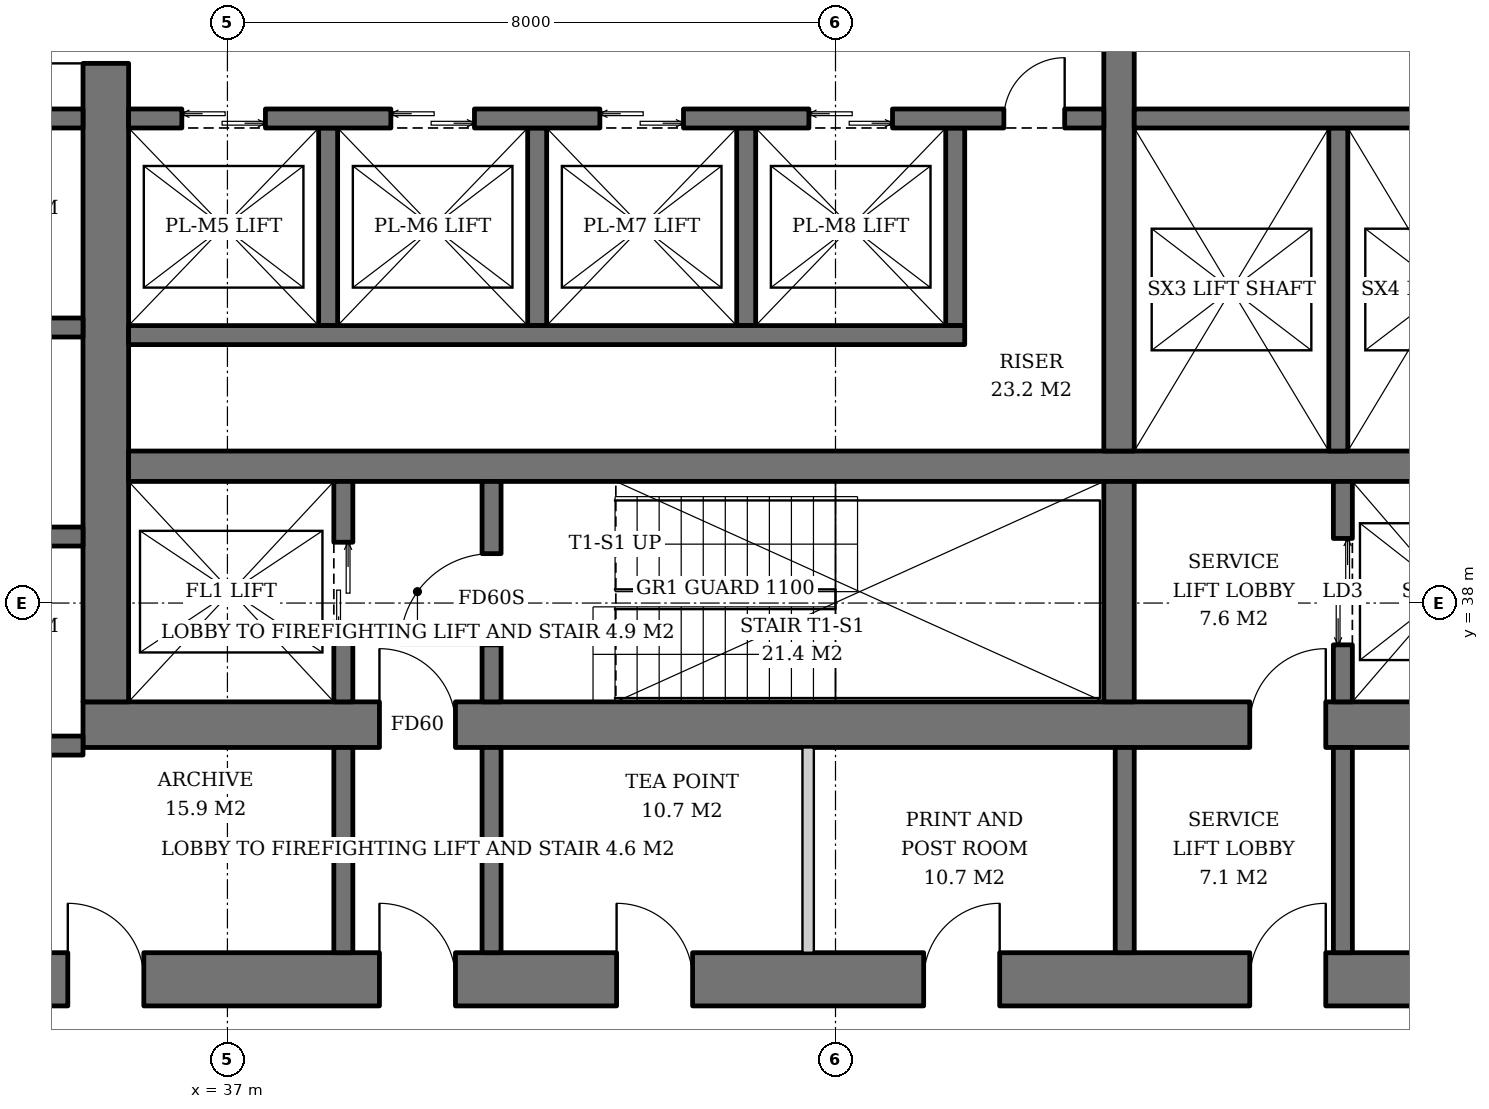
"""IFC4 building model, lengths in metres.
Left out: names, types, materials, properties, quantities, classifications, styles, units other than length and angle.
Written with IfcOpenShell. Run it as: python <this file> out.ifc"""

import sys

from ifc_helpers import new_model, si_unit, direction, frame, frame_2d, origin, place, context, subcontext, project, spatial, rectangle, extrude, element, fill, save


model = new_model("IFC4")
c1 = context("Model", 3, precision=1e-05, world=origin(), true_north=direction((0.0, 1.0)))
c2 = subcontext(c1, "Body", "Model", "MODEL_VIEW")
j1 = project(units=[si_unit("LENGTHUNIT", "METRE"), si_unit("PLANEANGLEUNIT", "RADIAN")], contexts=[c1])
p1 = place(None, origin())
s1 = spatial("IfcSite", under=j1, at=p1, CompositionType="ELEMENT")
p2 = place(p1, origin())
s2 = spatial("IfcBuilding", under=s1, at=p2, CompositionType="ELEMENT")
p3 = place(p2, frame((0.0, 0.0, 116.0)))
s3 = spatial("IfcBuildingStorey", under=s2, at=p3, CompositionType="ELEMENT", Elevation=116.0)
p4 = place(p3, frame((35.1, 36.4, 0.0), z_axis=(0.0, 0.0, 1.0), x_axis=(1.0, 0.0, 0.0)))
e1 = element("IfcWall", 1, at=p4, inside=s3, PredefinedType="SHEAR", context=c2, shape_type="SweptSolid", body=[
    extrude(rectangle(XDim=19.8, YDim=0.6, at=frame_2d((9.9, 0.0))), origin(), (0.0, 0.0, 1.0), 3.8),
])
p5 = place(p4, frame((3.9, 0.0, 0.0)))
e2 = element("IfcOpeningElement", 2, at=p5, cuts=e1, PredefinedType="OPENING", context=c2, shape_type="SweptSolid", body=[
    extrude(rectangle(XDim=1.0, YDim=2.1, at=frame_2d((0.5, 1.05))), frame((0.0, 0.31, 0.0), z_axis=(0.0, -1.0, 0.0), x_axis=(1.0, 0.0, 0.0)), (0.0, 0.0, 1.0), 0.62),
])
p6 = place(p4, frame((15.35, 0.0, 0.0)))
e3 = element("IfcOpeningElement", 3, at=p6, cuts=e1, PredefinedType="OPENING", context=c2, shape_type="SweptSolid", body=[
    extrude(rectangle(XDim=1.0, YDim=2.1, at=frame_2d((0.5, 1.05))), frame((0.0, 0.31, 0.0), z_axis=(0.0, -1.0, 0.0), x_axis=(1.0, 0.0, 0.0)), (0.0, 0.0, 1.0), 0.62),
])
p7 = place(p3, frame((35.4, 36.7, 0.0), z_axis=(0.0, 0.0, 1.0), x_axis=(0.0, 1.0, 0.0)))
e4 = element("IfcWall", 4, at=p7, inside=s3, PredefinedType="SHEAR", context=c2, shape_type="SweptSolid", body=[
    extrude(rectangle(XDim=18.6, YDim=0.6, at=frame_2d((9.3, 0.0))), origin(), (0.0, 0.0, 1.0), 3.8),
])
p8 = place(p7, frame((8.4, 0.0, 0.0)))
e5 = element("IfcOpeningElement", 5, at=p8, cuts=e4, PredefinedType="OPENING", context=c2, shape_type="SweptSolid", body=[
    extrude(rectangle(XDim=1.8, YDim=2.4, at=frame_2d((0.9, 1.2))), frame((0.0, 0.31, 0.0), z_axis=(0.0, -1.0, 0.0), x_axis=(1.0, 0.0, 0.0)), (0.0, 0.0, 1.0), 0.62),
])
p9 = place(p3, frame((31.7, 33.05, 0.0), z_axis=(0.0, 0.0, 1.0), x_axis=(1.0, 0.0, 0.0)))
e6 = element("IfcWall", 6, at=p9, inside=s3, PredefinedType="SHEAR", context=c2, shape_type="SweptSolid", body=[
    extrude(rectangle(XDim=26.6, YDim=0.7, at=frame_2d((13.3, 0.0))), origin(), (0.0, 0.0, 1.0), 3.8),
])
p10 = place(p9, frame((7.3, 0.0, 0.0)))
e7 = element("IfcOpeningElement", 7, at=p10, cuts=e6, PredefinedType="OPENING", context=c2, shape_type="SweptSolid", body=[
    extrude(rectangle(XDim=1.0, YDim=2.1, at=frame_2d((0.5, 1.05))), frame((0.0, 0.36, 0.0), z_axis=(0.0, -1.0, 0.0), x_axis=(1.0, 0.0, 0.0)), (0.0, 0.0, 1.0), 0.72),
])
p11 = place(p9, frame((18.75, 0.0, 0.0)))
e8 = element("IfcOpeningElement", 8, at=p11, cuts=e6, PredefinedType="OPENING", context=c2, shape_type="SweptSolid", body=[
    extrude(rectangle(XDim=1.0, YDim=2.1, at=frame_2d((0.5, 1.05))), frame((0.0, 0.36, 0.0), z_axis=(0.0, -1.0, 0.0), x_axis=(1.0, 0.0, 0.0)), (0.0, 0.0, 1.0), 0.72),
])
p12 = place(p9, frame((3.2, 0.0, 0.0)))
e9 = element("IfcOpeningElement", 9, at=p12, cuts=e6, PredefinedType="OPENING", context=c2, shape_type="SweptSolid", body=[
    extrude(rectangle(XDim=1.0, YDim=2.1, at=frame_2d((0.5, 1.05))), frame((0.0, 0.36, 0.0), z_axis=(0.0, -1.0, 0.0), x_axis=(1.0, 0.0, 0.0)), (0.0, 0.0, 1.0), 0.72),
])
p13 = place(p9, frame((10.42, 0.0, 0.0)))
e10 = element("IfcOpeningElement", 10, at=p13, cuts=e6, PredefinedType="OPENING", context=c2, shape_type="SweptSolid", body=[
    extrude(rectangle(XDim=1.0, YDim=2.1, at=frame_2d((0.5, 1.05))), frame((0.0, 0.36, 0.0), z_axis=(0.0, -1.0, 0.0), x_axis=(1.0, 0.0, 0.0)), (0.0, 0.0, 1.0), 0.72),
])
p14 = place(p9, frame((14.46, 0.0, 0.0)))
e11 = element("IfcOpeningElement", 11, at=p14, cuts=e6, PredefinedType="OPENING", context=c2, shape_type="SweptSolid", body=[
    extrude(rectangle(XDim=1.0, YDim=2.1, at=frame_2d((0.5, 1.05))), frame((0.0, 0.36, 0.0), z_axis=(0.0, -1.0, 0.0), x_axis=(1.0, 0.0, 0.0)), (0.0, 0.0, 1.0), 0.72),
])
p15 = place(p9, frame((22.5, 0.0, 0.0)))
e12 = element("IfcOpeningElement", 12, at=p15, cuts=e6, PredefinedType="OPENING", context=c2, shape_type="SweptSolid", body=[
    extrude(rectangle(XDim=1.0, YDim=2.1, at=frame_2d((0.5, 1.05))), frame((0.0, 0.36, 0.0), z_axis=(0.0, -1.0, 0.0), x_axis=(1.0, 0.0, 0.0)), (0.0, 0.0, 1.0), 0.72),
])
p16 = place(p3, frame((35.7, 39.8, 0.0), z_axis=(0.0, 0.0, 1.0), x_axis=(1.0, 0.0, 0.0)))
e13 = element("IfcWall", 13, at=p16, inside=s3, PredefinedType="SHEAR", context=c2, shape_type="SweptSolid", body=[
    extrude(rectangle(XDim=18.6, YDim=0.4, at=frame_2d((9.3, 0.0))), origin(), (0.0, 0.0, 1.0), 3.8),
])
p17 = place(p3, frame((48.73, 36.7, 0.0), z_axis=(0.0, 0.0, 1.0), x_axis=(0.0, 1.0, 0.0)))
e14 = element("IfcWall", 14, at=p17, inside=s3, PredefinedType="SHEAR", context=c2, shape_type="SweptSolid", body=[
    extrude(rectangle(XDim=2.9, YDim=0.4, at=frame_2d((1.45, 0.0))), origin(), (0.0, 0.0, 1.0), 3.8),
])
p18 = place(p3, frame((48.73, 40.0, 0.0), z_axis=(0.0, 0.0, 1.0), x_axis=(0.0, 1.0, 0.0)))
e15 = element("IfcWall", 15, at=p18, inside=s3, PredefinedType="SHEAR", context=c2, shape_type="SweptSolid", body=[
    extrude(rectangle(XDim=12.0, YDim=0.4, at=frame_2d((6.0, 0.0))), origin(), (0.0, 0.0, 1.0), 3.8),
])
p19 = place(p3, frame((38.525, 36.7, 0.0), z_axis=(0.0, 0.0, 1.0), x_axis=(0.0, 1.0, 0.0)))
e16 = element("IfcWall", 16, at=p19, inside=s3, PredefinedType="SHEAR", context=c2, shape_type="SweptSolid", body=[
    extrude(rectangle(XDim=2.9, YDim=0.25, at=frame_2d((1.45, 0.0))), origin(), (0.0, 0.0, 1.0), 3.8),
])
p20 = place(p19, frame((0.8, 0.0, 0.0)))
e17 = element("IfcOpeningElement", 17, at=p20, cuts=e16, PredefinedType="OPENING", context=c2, shape_type="SweptSolid", body=[
    extrude(rectangle(XDim=1.3, YDim=2.2, at=frame_2d((0.65, 1.1))), frame((0.0, 0.135, 0.0), z_axis=(0.0, -1.0, 0.0), x_axis=(1.0, 0.0, 0.0)), (0.0, 0.0, 1.0), 0.27),
])
p21 = place(p3, frame((40.475, 36.7, 0.0), z_axis=(0.0, 0.0, 1.0), x_axis=(0.0, 1.0, 0.0)))
e18 = element("IfcWall", 18, at=p21, inside=s3, PredefinedType="SHEAR", context=c2, shape_type="SweptSolid", body=[
    extrude(rectangle(XDim=2.9, YDim=0.25, at=frame_2d((1.45, 0.0))), origin(), (0.0, 0.0, 1.0), 3.8),
])
p22 = place(p21, frame((0.75, 0.0, 0.0)))
e19 = element("IfcOpeningElement", 19, at=p22, cuts=e18, PredefinedType="OPENING", context=c2, shape_type="SweptSolid", body=[
    extrude(rectangle(XDim=1.2, YDim=2.1, at=frame_2d((0.6, 1.05))), frame((0.0, 0.135, 0.0), z_axis=(0.0, -1.0, 0.0), x_axis=(1.0, 0.0, 0.0)), (0.0, 0.0, 1.0), 0.27),
])
p23 = place(p3, frame((51.675, 36.7, 0.0), z_axis=(0.0, 0.0, 1.0), x_axis=(0.0, 1.0, 0.0)))
e20 = element("IfcWall", 20, at=p23, inside=s3, PredefinedType="SHEAR", context=c2, shape_type="SweptSolid", body=[
    extrude(rectangle(XDim=2.9, YDim=0.25, at=frame_2d((1.45, 0.0))), origin(), (0.0, 0.0, 1.0), 3.8),
])
p24 = place(p23, frame((0.75, 0.0, 0.0)))
e21 = element("IfcOpeningElement", 21, at=p24, cuts=e20, PredefinedType="OPENING", context=c2, shape_type="SweptSolid", body=[
    extrude(rectangle(XDim=1.4, YDim=2.4, at=frame_2d((0.7, 1.2))), frame((0.0, 0.135, 0.0), z_axis=(0.0, -1.0, 0.0), x_axis=(1.0, 0.0, 0.0)), (0.0, 0.0, 1.0), 0.27),
])
for number, where, z_axis, x_axis in (
    (22, (38.325, 44.25, 0.0), (0.0, 0.0, 1.0), (0.0, -1.0, 0.0)),
    (23, (41.075, 44.25, 0.0), (0.0, 0.0, 1.0), (0.0, -1.0, 0.0)),
    (24, (43.825, 44.25, 0.0), (0.0, 0.0, 1.0), (0.0, -1.0, 0.0)),
    (25, (46.575, 44.25, 0.0), (0.0, 0.0, 1.0), (0.0, -1.0, 0.0)),
):
    element("IfcWall", number, at=place(p3, frame(where, z_axis=z_axis, x_axis=x_axis)), inside=s3, PredefinedType="SHEAR", context=c2, shape_type="SweptSolid", body=[
        extrude(rectangle(XDim=2.6, YDim=0.25, at=frame_2d((1.3, 0.0))), origin(), (0.0, 0.0, 1.0), 3.8),
    ])
p25 = place(p3, frame((35.7, 41.525, 0.0), z_axis=(0.0, 0.0, 1.0), x_axis=(1.0, 0.0, 0.0)))
e26 = element("IfcWall", 26, at=p25, inside=s3, PredefinedType="SHEAR", context=c2, shape_type="SweptSolid", body=[
    extrude(rectangle(XDim=11.0, YDim=0.25, at=frame_2d((5.5, 0.0))), origin(), (0.0, 0.0, 1.0), 3.8),
])
p26 = place(p3, frame((35.7, 44.375, 0.0), z_axis=(0.0, 0.0, 1.0), x_axis=(1.0, 0.0, 0.0)))
e27 = element("IfcWall", 27, at=p26, inside=s3, PredefinedType="SHEAR", context=c2, shape_type="SweptSolid", body=[
    extrude(rectangle(XDim=12.83, YDim=0.25, at=frame_2d((6.415, 0.0))), origin(), (0.0, 0.0, 1.0), 3.8),
])
p27 = place(p26, frame((0.7, 0.0, 0.0)))
e28 = element("IfcOpeningElement", 28, at=p27, cuts=e27, PredefinedType="OPENING", context=c2, shape_type="SweptSolid", body=[
    extrude(rectangle(XDim=1.1, YDim=2.2, at=frame_2d((0.55, 1.1))), frame((0.0, 0.135, 0.0), z_axis=(0.0, -1.0, 0.0), x_axis=(1.0, 0.0, 0.0)), (0.0, 0.0, 1.0), 0.27),
])
p28 = place(p26, frame((3.45, 0.0, 0.0)))
e29 = element("IfcOpeningElement", 29, at=p28, cuts=e27, PredefinedType="OPENING", context=c2, shape_type="SweptSolid", body=[
    extrude(rectangle(XDim=1.1, YDim=2.2, at=frame_2d((0.55, 1.1))), frame((0.0, 0.135, 0.0), z_axis=(0.0, -1.0, 0.0), x_axis=(1.0, 0.0, 0.0)), (0.0, 0.0, 1.0), 0.27),
])
p29 = place(p26, frame((6.2, 0.0, 0.0)))
e30 = element("IfcOpeningElement", 30, at=p29, cuts=e27, PredefinedType="OPENING", context=c2, shape_type="SweptSolid", body=[
    extrude(rectangle(XDim=1.1, YDim=2.2, at=frame_2d((0.55, 1.1))), frame((0.0, 0.135, 0.0), z_axis=(0.0, -1.0, 0.0), x_axis=(1.0, 0.0, 0.0)), (0.0, 0.0, 1.0), 0.27),
])
p30 = place(p26, frame((8.95, 0.0, 0.0)))
e31 = element("IfcOpeningElement", 31, at=p30, cuts=e27, PredefinedType="OPENING", context=c2, shape_type="SweptSolid", body=[
    extrude(rectangle(XDim=1.1, YDim=2.2, at=frame_2d((0.55, 1.1))), frame((0.0, 0.135, 0.0), z_axis=(0.0, -1.0, 0.0), x_axis=(1.0, 0.0, 0.0)), (0.0, 0.0, 1.0), 0.27),
])
p31 = place(p26, frame((11.515, 0.0, 0.0)))
e32 = element("IfcOpeningElement", 32, at=p31, cuts=e27, PredefinedType="OPENING", context=c2, shape_type="SweptSolid", body=[
    extrude(rectangle(XDim=0.8, YDim=2.0, at=frame_2d((0.4, 1.0))), frame((0.0, 0.135, 0.0), z_axis=(0.0, -1.0, 0.0), x_axis=(1.0, 0.0, 0.0)), (0.0, 0.0, 1.0), 0.27),
])
p32 = place(p3, frame((51.615, 44.25, 0.0), z_axis=(0.0, 0.0, 1.0), x_axis=(0.0, -1.0, 0.0)))
e33 = element("IfcWall", 33, at=p32, inside=s3, PredefinedType="SHEAR", context=c2, shape_type="SweptSolid", body=[
    extrude(rectangle(XDim=4.25, YDim=0.25, at=frame_2d((2.125, 0.0))), origin(), (0.0, 0.0, 1.0), 3.8),
])
p33 = place(p3, frame((48.93, 44.375, 0.0), z_axis=(0.0, 0.0, 1.0), x_axis=(1.0, 0.0, 0.0)))
e34 = element("IfcWall", 34, at=p33, inside=s3, PredefinedType="SHEAR", context=c2, shape_type="SweptSolid", body=[
    extrude(rectangle(XDim=5.37, YDim=0.25, at=frame_2d((2.685, 0.0))), origin(), (0.0, 0.0, 1.0), 3.8),
])
for number, where, z_axis, x_axis in (
    (35, (32.4, 36.125, 0.0), (0.0, 0.0, 1.0), (1.0, 0.0, 0.0)),
    (36, (32.4, 38.875, 0.0), (0.0, 0.0, 1.0), (1.0, 0.0, 0.0)),
    (37, (32.4, 41.625, 0.0), (0.0, 0.0, 1.0), (1.0, 0.0, 0.0)),
    (38, (32.4, 44.375, 0.0), (0.0, 0.0, 1.0), (1.0, 0.0, 0.0)),
):
    element("IfcWall", number, at=place(p3, frame(where, z_axis=z_axis, x_axis=x_axis)), inside=s3, PredefinedType="SHEAR", context=c2, shape_type="SweptSolid", body=[
        extrude(rectangle(XDim=2.7, YDim=0.25, at=frame_2d((1.35, 0.0))), origin(), (0.0, 0.0, 1.0), 3.8),
    ])
for number, where, z_axis, x_axis in (
    (39, (38.525, 33.4, 0.0), (0.0, 0.0, 1.0), (0.0, 1.0, 0.0)),
    (40, (40.475, 33.4, 0.0), (0.0, 0.0, 1.0), (0.0, 1.0, 0.0)),
    (41, (48.805, 33.4, 0.0), (0.0, 0.0, 1.0), (0.0, 1.0, 0.0)),
    (42, (51.675, 33.4, 0.0), (0.0, 0.0, 1.0), (0.0, 1.0, 0.0)),
):
    element("IfcWall", number, at=place(p3, frame(where, z_axis=z_axis, x_axis=x_axis)), inside=s3, PredefinedType="SOLIDWALL", context=c2, shape_type="SweptSolid", body=[
        extrude(rectangle(XDim=2.7, YDim=0.25, at=frame_2d((1.35, 0.0))), origin(), (0.0, 0.0, 1.0), 3.62),
    ])
p34 = place(p3, frame((44.64, 33.4, 0.0), z_axis=(0.0, 0.0, 1.0), x_axis=(0.0, 1.0, 0.0)))
e43 = element("IfcWall", 43, at=p34, inside=s3, PredefinedType="SOLIDWALL", context=c2, shape_type="SweptSolid", body=[
    extrude(rectangle(XDim=2.7, YDim=0.15, at=frame_2d((1.35, 0.0))), origin(), (0.0, 0.0, 1.0), 3.62),
])
p35 = place(p20, origin())
e44 = element("IfcDoor", 44, at=p35, inside=s3, OperationType="DOUBLE_DOOR_SLIDING", PredefinedType="DOOR", context=c2, shape_type="SweptSolid", body=[
    extrude(rectangle(XDim=1.3, YDim=2.2, at=frame_2d((0.65, 1.1))), frame((0.0, 0.025, 0.0), z_axis=(0.0, -1.0, 0.0), x_axis=(1.0, 0.0, 0.0)), (0.0, 0.0, 1.0), 0.05),
])
fill(e17, e44)
p36 = place(p22, origin())
e45 = element("IfcDoor", 45, at=p36, inside=s3, OperationType="SINGLE_SWING_LEFT", PredefinedType="DOOR", context=c2, shape_type="SweptSolid", body=[
    extrude(rectangle(XDim=1.2, YDim=2.1, at=frame_2d((0.6, 1.05))), frame((0.0, 0.025, 0.0), z_axis=(0.0, -1.0, 0.0), x_axis=(1.0, 0.0, 0.0)), (0.0, 0.0, 1.0), 0.05),
])
fill(e19, e45)
p37 = place(p24, origin())
e46 = element("IfcDoor", 46, at=p37, inside=s3, OperationType="DOUBLE_DOOR_SLIDING", PredefinedType="DOOR", context=c2, shape_type="SweptSolid", body=[
    extrude(rectangle(XDim=1.4, YDim=2.4, at=frame_2d((0.7, 1.2))), frame((0.0, 0.025, 0.0), z_axis=(0.0, -1.0, 0.0), x_axis=(1.0, 0.0, 0.0)), (0.0, 0.0, 1.0), 0.05),
])
fill(e21, e46)
p38 = place(p27, origin())
e47 = element("IfcDoor", 47, at=p38, inside=s3, OperationType="DOUBLE_DOOR_SLIDING", PredefinedType="DOOR", context=c2, shape_type="SweptSolid", body=[
    extrude(rectangle(XDim=1.1, YDim=2.2, at=frame_2d((0.55, 1.1))), frame((0.0, 0.025, 0.0), z_axis=(0.0, -1.0, 0.0), x_axis=(1.0, 0.0, 0.0)), (0.0, 0.0, 1.0), 0.05),
])
fill(e28, e47)
p39 = place(p28, origin())
e48 = element("IfcDoor", 48, at=p39, inside=s3, OperationType="DOUBLE_DOOR_SLIDING", PredefinedType="DOOR", context=c2, shape_type="SweptSolid", body=[
    extrude(rectangle(XDim=1.1, YDim=2.2, at=frame_2d((0.55, 1.1))), frame((0.0, 0.025, 0.0), z_axis=(0.0, -1.0, 0.0), x_axis=(1.0, 0.0, 0.0)), (0.0, 0.0, 1.0), 0.05),
])
fill(e29, e48)
p40 = place(p29, origin())
e49 = element("IfcDoor", 49, at=p40, inside=s3, OperationType="DOUBLE_DOOR_SLIDING", PredefinedType="DOOR", context=c2, shape_type="SweptSolid", body=[
    extrude(rectangle(XDim=1.1, YDim=2.2, at=frame_2d((0.55, 1.1))), frame((0.0, 0.025, 0.0), z_axis=(0.0, -1.0, 0.0), x_axis=(1.0, 0.0, 0.0)), (0.0, 0.0, 1.0), 0.05),
])
fill(e30, e49)
p41 = place(p30, origin())
e50 = element("IfcDoor", 50, at=p41, inside=s3, OperationType="DOUBLE_DOOR_SLIDING", PredefinedType="DOOR", context=c2, shape_type="SweptSolid", body=[
    extrude(rectangle(XDim=1.1, YDim=2.2, at=frame_2d((0.55, 1.1))), frame((0.0, 0.025, 0.0), z_axis=(0.0, -1.0, 0.0), x_axis=(1.0, 0.0, 0.0)), (0.0, 0.0, 1.0), 0.05),
])
fill(e31, e50)
p42 = place(p31, origin())
e51 = element("IfcDoor", 51, at=p42, inside=s3, OperationType="SINGLE_SWING_RIGHT", PredefinedType="DOOR", context=c2, shape_type="SweptSolid", body=[
    extrude(rectangle(XDim=0.8, YDim=2.0, at=frame_2d((0.4, 1.0))), frame((0.0, 0.025, 0.0), z_axis=(0.0, -1.0, 0.0), x_axis=(1.0, 0.0, 0.0)), (0.0, 0.0, 1.0), 0.05),
])
fill(e32, e51)
p43 = place(p5, origin())
e52 = element("IfcDoor", 52, at=p43, inside=s3, OperationType="SINGLE_SWING_LEFT", PredefinedType="DOOR", context=c2, shape_type="SweptSolid", body=[
    extrude(rectangle(XDim=1.0, YDim=2.1, at=frame_2d((0.5, 1.05))), frame((0.0, 0.025, 0.0), z_axis=(0.0, -1.0, 0.0), x_axis=(1.0, 0.0, 0.0)), (0.0, 0.0, 1.0), 0.05),
])
fill(e2, e52)
p44 = place(p8, origin())
e53 = element("IfcDoor", 53, at=p44, inside=s3, OperationType="DOUBLE_DOOR_SINGLE_SWING", PredefinedType="DOOR", context=c2, shape_type="SweptSolid", body=[
    extrude(rectangle(XDim=1.8, YDim=2.4, at=frame_2d((0.9, 1.2))), frame((0.0, 0.025, 0.0), z_axis=(0.0, -1.0, 0.0), x_axis=(1.0, 0.0, 0.0)), (0.0, 0.0, 1.0), 0.05),
])
fill(e5, e53)
p45 = place(p6, origin())
e54 = element("IfcDoor", 54, at=p45, inside=s3, OperationType="SINGLE_SWING_RIGHT", PredefinedType="DOOR", context=c2, shape_type="SweptSolid", body=[
    extrude(rectangle(XDim=1.0, YDim=2.1, at=frame_2d((0.5, 1.05))), frame((0.0, 0.025, 0.0), z_axis=(0.0, -1.0, 0.0), x_axis=(1.0, 0.0, 0.0)), (0.0, 0.0, 1.0), 0.05),
])
fill(e3, e54)
p46 = place(p10, origin())
e55 = element("IfcDoor", 55, at=p46, inside=s3, OperationType="SINGLE_SWING_LEFT", PredefinedType="DOOR", context=c2, shape_type="SweptSolid", body=[
    extrude(rectangle(XDim=1.0, YDim=2.1, at=frame_2d((0.5, 1.05))), frame((0.0, 0.025, 0.0), z_axis=(0.0, -1.0, 0.0), x_axis=(1.0, 0.0, 0.0)), (0.0, 0.0, 1.0), 0.05),
])
fill(e7, e55)
p47 = place(p11, origin())
e56 = element("IfcDoor", 56, at=p47, inside=s3, OperationType="SINGLE_SWING_RIGHT", PredefinedType="DOOR", context=c2, shape_type="SweptSolid", body=[
    extrude(rectangle(XDim=1.0, YDim=2.1, at=frame_2d((0.5, 1.05))), frame((0.0, 0.025, 0.0), z_axis=(0.0, -1.0, 0.0), x_axis=(1.0, 0.0, 0.0)), (0.0, 0.0, 1.0), 0.05),
])
fill(e8, e56)
p48 = place(p12, origin())
e57 = element("IfcDoor", 57, at=p48, inside=s3, OperationType="SINGLE_SWING_LEFT", PredefinedType="DOOR", context=c2, shape_type="SweptSolid", body=[
    extrude(rectangle(XDim=1.0, YDim=2.1, at=frame_2d((0.5, 1.05))), frame((0.0, 0.34, 0.0), z_axis=(0.0, -1.0, 0.0), x_axis=(1.0, 0.0, 0.0)), (0.0, 0.0, 1.0), 0.05),
])
fill(e9, e57)
p49 = place(p13, origin())
e58 = element("IfcDoor", 58, at=p49, inside=s3, OperationType="SINGLE_SWING_LEFT", PredefinedType="DOOR", context=c2, shape_type="SweptSolid", body=[
    extrude(rectangle(XDim=1.0, YDim=2.1, at=frame_2d((0.5, 1.05))), frame((0.0, 0.34, 0.0), z_axis=(0.0, -1.0, 0.0), x_axis=(1.0, 0.0, 0.0)), (0.0, 0.0, 1.0), 0.05),
])
fill(e10, e58)
p50 = place(p14, origin())
e59 = element("IfcDoor", 59, at=p50, inside=s3, OperationType="SINGLE_SWING_RIGHT", PredefinedType="DOOR", context=c2, shape_type="SweptSolid", body=[
    extrude(rectangle(XDim=1.0, YDim=2.1, at=frame_2d((0.5, 1.05))), frame((0.0, 0.34, 0.0), z_axis=(0.0, -1.0, 0.0), x_axis=(1.0, 0.0, 0.0)), (0.0, 0.0, 1.0), 0.05),
])
fill(e11, e59)
save(model, sys.argv[1])
